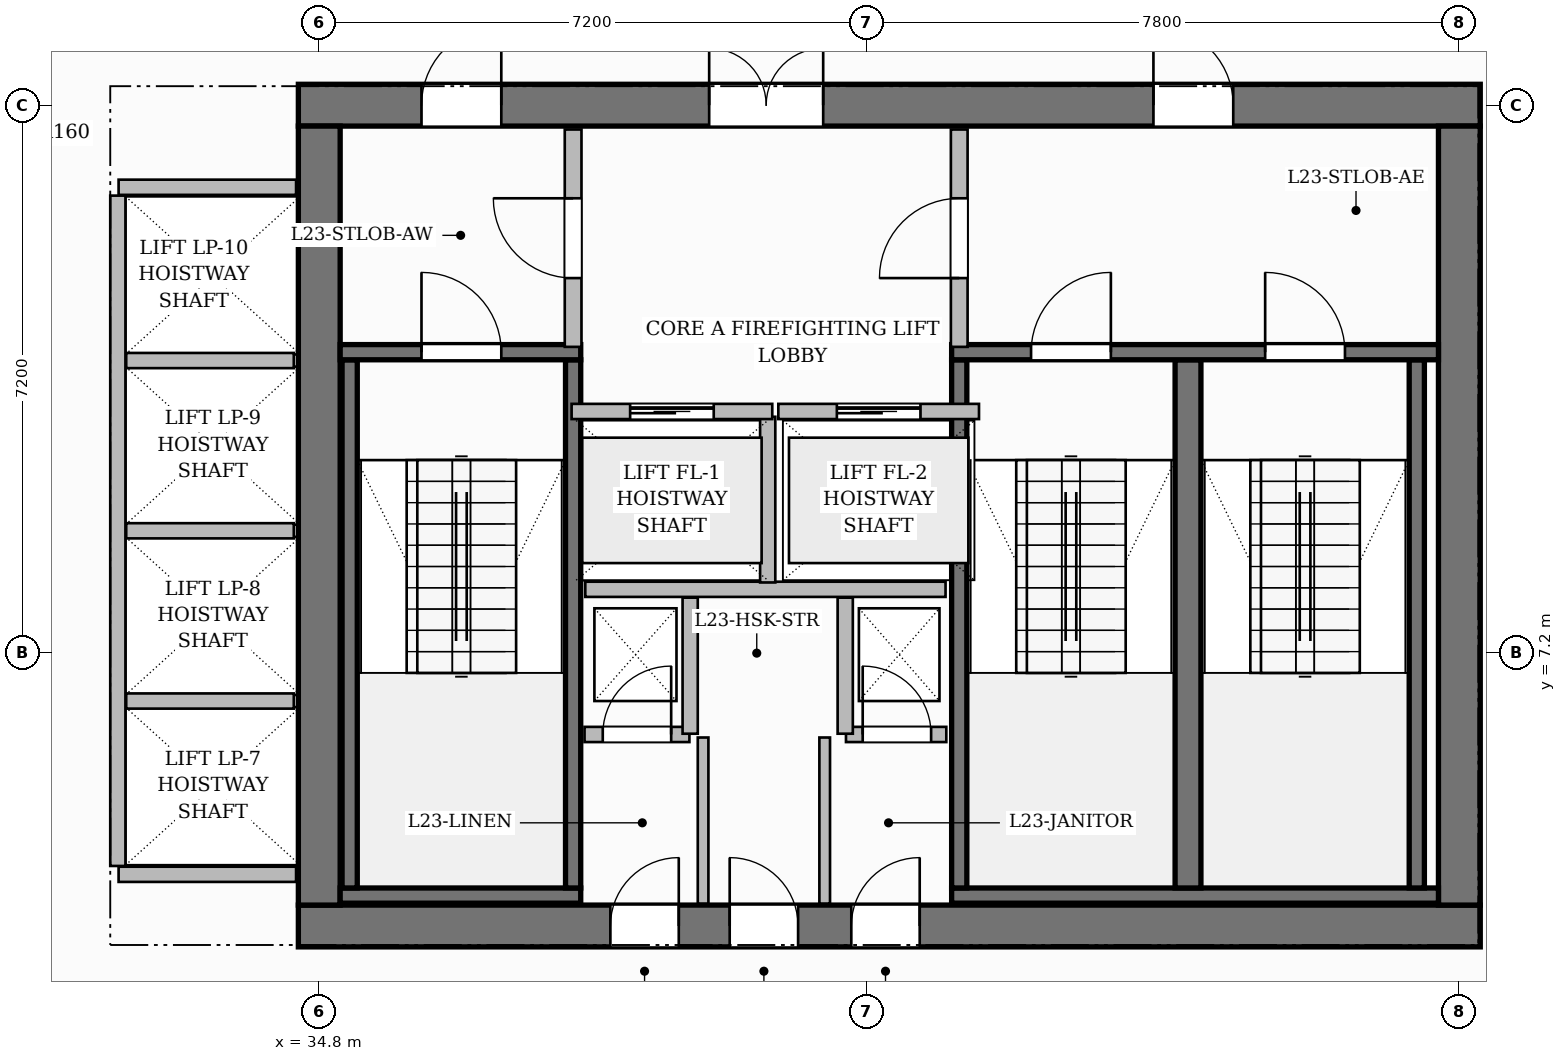
"""IFC4 building model, lengths in metres.
Left out: names, types, materials, properties, quantities, classifications, styles, units other than length and angle.
Written with IfcOpenShell. Run it as: python <this file> out.ifc"""

import sys

from ifc_helpers import new_model, si_unit, direction, frame, frame_2d, origin, place, context, subcontext, project, spatial, rectangle, extrude, source, transform, mapped, element, fill, save


model = new_model("IFC4")
c1 = context("Model", 3, precision=1e-05, world=origin(), true_north=direction((0.0, 1.0)))
c2 = subcontext(c1, "Body", "Model", "MODEL_VIEW")
j1 = project(units=[si_unit("LENGTHUNIT", "METRE"), si_unit("PLANEANGLEUNIT", "RADIAN")], contexts=[c1])
p1 = place(None, origin())
s1 = spatial("IfcSite", under=j1, at=p1, CompositionType="ELEMENT")
p2 = place(p1, origin())
s2 = spatial("IfcBuilding", under=s1, at=p2, CompositionType="ELEMENT")
p3 = place(p2, frame((0.0, 0.0, 95.3)))
s3 = spatial("IfcBuildingStorey", under=s2, at=p3, CompositionType="ELEMENT", Elevation=95.3)
p4 = place(p3, frame((34.525, 3.6, 0.0), z_axis=(0.0, 0.0, 1.0), x_axis=(1.0, 0.0, 0.0)))
e1 = element("IfcWall", 1, at=p4, inside=s3, PredefinedType="SHEAR", context=c2, shape_type="SweptSolid", body=[
    extrude(rectangle(XDim=15.55, YDim=0.55, at=frame_2d((7.775, 0.0))), origin(), (0.0, 0.0, 1.0), 3.7),
])
p5 = place(p4, frame((4.105, 0.0, 0.0)))
e2 = element("IfcOpeningElement", 2, at=p5, cuts=e1, PredefinedType="OPENING", context=c2, shape_type="SweptSolid", body=[
    extrude(rectangle(XDim=0.9, YDim=2.1, at=frame_2d((0.45, 1.05))), frame((0.0, 0.285, 0.0), z_axis=(0.0, -1.0, 0.0), x_axis=(1.0, 0.0, 0.0)), (0.0, 0.0, 1.0), 0.57),
])
p6 = place(p4, frame((5.675, 0.0, 0.0)))
e3 = element("IfcOpeningElement", 3, at=p6, cuts=e1, PredefinedType="OPENING", context=c2, shape_type="SweptSolid", body=[
    extrude(rectangle(XDim=0.9, YDim=2.1, at=frame_2d((0.45, 1.05))), frame((0.0, 0.285, 0.0), z_axis=(0.0, -1.0, 0.0), x_axis=(1.0, 0.0, 0.0)), (0.0, 0.0, 1.0), 0.57),
])
p7 = place(p4, frame((7.275, 0.0, 0.0)))
e4 = element("IfcOpeningElement", 4, at=p7, cuts=e1, PredefinedType="OPENING", context=c2, shape_type="SweptSolid", body=[
    extrude(rectangle(XDim=0.9, YDim=2.1, at=frame_2d((0.45, 1.05))), frame((0.0, 0.285, 0.0), z_axis=(0.0, -1.0, 0.0), x_axis=(1.0, 0.0, 0.0)), (0.0, 0.0, 1.0), 0.57),
])
p8 = place(p3, frame((34.525, 14.4, 0.0), z_axis=(0.0, 0.0, 1.0), x_axis=(1.0, 0.0, 0.0)))
e5 = element("IfcWall", 5, at=p8, inside=s3, PredefinedType="SHEAR", context=c2, shape_type="SweptSolid", body=[
    extrude(rectangle(XDim=15.55, YDim=0.55, at=frame_2d((7.775, 0.0))), origin(), (0.0, 0.0, 1.0), 3.7),
])
p9 = place(p8, frame((5.405, 0.0, 0.0)))
e6 = element("IfcOpeningElement", 6, at=p9, cuts=e5, PredefinedType="OPENING", context=c2, shape_type="SweptSolid", body=[
    extrude(rectangle(XDim=1.5, YDim=2.2, at=frame_2d((0.75, 1.1))), frame((0.0, 0.285, 0.0), z_axis=(0.0, -1.0, 0.0), x_axis=(1.0, 0.0, 0.0)), (0.0, 0.0, 1.0), 0.57),
])
p10 = place(p8, frame((1.62, 0.0, 0.0)))
e7 = element("IfcOpeningElement", 7, at=p10, cuts=e5, PredefinedType="OPENING", context=c2, shape_type="SweptSolid", body=[
    extrude(rectangle(XDim=1.05, YDim=2.15, at=frame_2d((0.525, 1.075))), frame((0.0, 0.285, 0.0), z_axis=(0.0, -1.0, 0.0), x_axis=(1.0, 0.0, 0.0)), (0.0, 0.0, 1.0), 0.57),
])
p11 = place(p8, frame((11.25, 0.0, 0.0)))
e8 = element("IfcOpeningElement", 8, at=p11, cuts=e5, PredefinedType="OPENING", context=c2, shape_type="SweptSolid", body=[
    extrude(rectangle(XDim=1.05, YDim=2.15, at=frame_2d((0.525, 1.075))), frame((0.0, 0.285, 0.0), z_axis=(0.0, -1.0, 0.0), x_axis=(1.0, 0.0, 0.0)), (0.0, 0.0, 1.0), 0.57),
])
for number, where, z_axis, x_axis in (
    (9, (34.8, 3.875, 0.0), (0.0, 0.0, 1.0), (0.0, 1.0, 0.0)),
    (10, (49.8, 3.875, 0.0), (0.0, 0.0, 1.0), (0.0, 1.0, 0.0)),
):
    element("IfcWall", number, at=place(p3, frame(where, z_axis=z_axis, x_axis=x_axis)), inside=s3, PredefinedType="SHEAR", context=c2, shape_type="SweptSolid", body=[
        extrude(rectangle(XDim=10.25, YDim=0.55, at=frame_2d((5.125, 0.0))), origin(), (0.0, 0.0, 1.0), 3.7),
    ])
p12 = place(p3, frame((35.075, 4.0, 0.0), z_axis=(0.0, 0.0, 1.0), x_axis=(1.0, 0.0, 0.0)))
e11 = element("IfcWall", 11, at=p12, inside=s3, PredefinedType="SHEAR", context=c2, shape_type="SweptSolid", body=[
    extrude(rectangle(XDim=3.165, YDim=0.2, at=frame_2d((1.583, 0.0))), origin(), (0.0, 0.0, 1.0), 3.7),
])
for number, where, z_axis, x_axis in (
    (12, (35.2, 4.1, 0.0), (0.0, 0.0, 1.0), (0.0, 1.0, 0.0)),
    (13, (38.14, 4.1, 0.0), (0.0, 0.0, 1.0), (0.0, 1.0, 0.0)),
):
    element("IfcWall", number, at=place(p3, frame(where, z_axis=z_axis, x_axis=x_axis)), inside=s3, PredefinedType="SHEAR", context=c2, shape_type="SweptSolid", body=[
        extrude(rectangle(XDim=6.95, YDim=0.2, at=frame_2d((3.475, 0.0))), origin(), (0.0, 0.0, 1.0), 3.7),
    ])
p13 = place(p3, frame((35.075, 11.15, 0.0), z_axis=(0.0, 0.0, 1.0), x_axis=(1.0, 0.0, 0.0)))
e14 = element("IfcWall", 14, at=p13, inside=s3, PredefinedType="SHEAR", context=c2, shape_type="SweptSolid", body=[
    extrude(rectangle(XDim=3.165, YDim=0.2, at=frame_2d((1.583, 0.0))), origin(), (0.0, 0.0, 1.0), 3.7),
])
p14 = place(p13, frame((1.07, 0.0, 0.0)))
e15 = element("IfcOpeningElement", 15, at=p14, cuts=e14, PredefinedType="OPENING", context=c2, shape_type="SweptSolid", body=[
    extrude(rectangle(XDim=1.05, YDim=2.2, at=frame_2d((0.525, 1.1))), frame((0.0, 0.11, 0.0), z_axis=(0.0, -1.0, 0.0), x_axis=(1.0, 0.0, 0.0)), (0.0, 0.0, 1.0), 0.22),
])
p15 = place(p3, frame((43.12, 4.0, 0.0), z_axis=(0.0, 0.0, 1.0), x_axis=(1.0, 0.0, 0.0)))
e16 = element("IfcWall", 16, at=p15, inside=s3, PredefinedType="SHEAR", context=c2, shape_type="SweptSolid", body=[
    extrude(rectangle(XDim=6.405, YDim=0.2, at=frame_2d((3.202, 0.0))), origin(), (0.0, 0.0, 1.0), 3.7),
])
p16 = place(p3, frame((43.22, 4.1, 0.0), z_axis=(0.0, 0.0, 1.0), x_axis=(0.0, 1.0, 0.0)))
e17 = element("IfcWall", 17, at=p16, inside=s3, PredefinedType="SHEAR", context=c2, shape_type="SweptSolid", body=[
    extrude(rectangle(XDim=6.95, YDim=0.2, at=frame_2d((3.475, 0.0))), origin(), (0.0, 0.0, 1.0), 3.7),
])
p17 = place(p3, frame((46.23, 4.1, 0.0), z_axis=(0.0, 0.0, 1.0), x_axis=(0.0, 1.0, 0.0)))
e18 = element("IfcWall", 18, at=p17, inside=s3, PredefinedType="SHEAR", context=c2, shape_type="SweptSolid", body=[
    extrude(rectangle(XDim=6.95, YDim=0.34, at=frame_2d((3.475, 0.0))), origin(), (0.0, 0.0, 1.0), 3.7),
])
p18 = place(p3, frame((49.24, 4.1, 0.0), z_axis=(0.0, 0.0, 1.0), x_axis=(0.0, 1.0, 0.0)))
e19 = element("IfcWall", 19, at=p18, inside=s3, PredefinedType="SHEAR", context=c2, shape_type="SweptSolid", body=[
    extrude(rectangle(XDim=6.95, YDim=0.2, at=frame_2d((3.475, 0.0))), origin(), (0.0, 0.0, 1.0), 3.7),
])
p19 = place(p3, frame((43.12, 11.15, 0.0), z_axis=(0.0, 0.0, 1.0), x_axis=(1.0, 0.0, 0.0)))
e20 = element("IfcWall", 20, at=p19, inside=s3, PredefinedType="SHEAR", context=c2, shape_type="SweptSolid", body=[
    extrude(rectangle(XDim=6.405, YDim=0.2, at=frame_2d((3.202, 0.0))), origin(), (0.0, 0.0, 1.0), 3.7),
])
p20 = place(p19, frame((1.045, 0.0, 0.0)))
e21 = element("IfcOpeningElement", 21, at=p20, cuts=e20, PredefinedType="OPENING", context=c2, shape_type="SweptSolid", body=[
    extrude(rectangle(XDim=1.05, YDim=2.2, at=frame_2d((0.525, 1.1))), frame((0.0, 0.11, 0.0), z_axis=(0.0, -1.0, 0.0), x_axis=(1.0, 0.0, 0.0)), (0.0, 0.0, 1.0), 0.22),
])
p21 = place(p19, frame((4.125, 0.0, 0.0)))
e22 = element("IfcOpeningElement", 22, at=p21, cuts=e20, PredefinedType="OPENING", context=c2, shape_type="SweptSolid", body=[
    extrude(rectangle(XDim=1.05, YDim=2.2, at=frame_2d((0.525, 1.1))), frame((0.0, 0.11, 0.0), z_axis=(0.0, -1.0, 0.0), x_axis=(1.0, 0.0, 0.0)), (0.0, 0.0, 1.0), 0.22),
])
p22 = place(p3, frame((38.3, 8.03, 0.0), z_axis=(0.0, 0.0, 1.0), x_axis=(1.0, 0.0, 0.0)))
e23 = element("IfcWall", 23, at=p22, inside=s3, PredefinedType="PARTITIONING", context=c2, shape_type="SweptSolid", body=[
    extrude(rectangle(XDim=4.74, YDim=0.2, at=frame_2d((2.37, 0.0))), origin(), (0.0, 0.0, 1.0), 3.45),
])
p23 = place(p3, frame((40.7, 8.12, 0.0), z_axis=(0.0, 0.0, 1.0), x_axis=(0.0, 1.0, 0.0)))
e24 = element("IfcWall", 24, at=p23, inside=s3, PredefinedType="PARTITIONING", context=c2, shape_type="SweptSolid", body=[
    extrude(rectangle(XDim=2.18, YDim=0.2, at=frame_2d((1.09, 0.0))), origin(), (0.0, 0.0, 1.0), 3.45),
])
p24 = place(p3, frame((38.14, 11.22, 0.0), z_axis=(0.0, 0.0, 1.0), x_axis=(0.0, 1.0, 0.0)))
e25 = element("IfcWall", 25, at=p24, inside=s3, PredefinedType="PARTITIONING", context=c2, shape_type="SweptSolid", body=[
    extrude(rectangle(XDim=2.86, YDim=0.22, at=frame_2d((1.43, 0.0))), origin(), (0.0, 0.0, 1.0), 3.45),
])
p25 = place(p24, frame((0.905, 0.0, 0.0)))
e26 = element("IfcOpeningElement", 26, at=p25, cuts=e25, PredefinedType="OPENING", context=c2, shape_type="SweptSolid", body=[
    extrude(rectangle(XDim=1.05, YDim=2.15, at=frame_2d((0.525, 1.075))), frame((0.0, 0.12, 0.0), z_axis=(0.0, -1.0, 0.0), x_axis=(1.0, 0.0, 0.0)), (0.0, 0.0, 1.0), 0.24),
])
p26 = place(p3, frame((43.22, 11.22, 0.0), z_axis=(0.0, 0.0, 1.0), x_axis=(0.0, 1.0, 0.0)))
e27 = element("IfcWall", 27, at=p26, inside=s3, PredefinedType="PARTITIONING", context=c2, shape_type="SweptSolid", body=[
    extrude(rectangle(XDim=2.86, YDim=0.22, at=frame_2d((1.43, 0.0))), origin(), (0.0, 0.0, 1.0), 3.45),
])
p27 = place(p26, frame((0.905, 0.0, 0.0)))
e28 = element("IfcOpeningElement", 28, at=p27, cuts=e27, PredefinedType="OPENING", context=c2, shape_type="SweptSolid", body=[
    extrude(rectangle(XDim=1.05, YDim=2.15, at=frame_2d((0.525, 1.075))), frame((0.0, 0.12, 0.0), z_axis=(0.0, -1.0, 0.0), x_axis=(1.0, 0.0, 0.0)), (0.0, 0.0, 1.0), 0.24),
])
p28 = place(p3, frame((38.29, 6.12, 0.0), z_axis=(0.0, 0.0, 1.0), x_axis=(1.0, 0.0, 0.0)))
e29 = element("IfcWall", 29, at=p28, inside=s3, PredefinedType="PARTITIONING", context=c2, shape_type="SweptSolid", body=[
    extrude(rectangle(XDim=1.38, YDim=0.2, at=frame_2d((0.69, 0.0))), origin(), (0.0, 0.0, 1.0), 3.45),
])
p29 = place(p28, frame((0.24, 0.0, 0.0)))
e30 = element("IfcOpeningElement", 30, at=p29, cuts=e29, PredefinedType="OPENING", context=c2, shape_type="SweptSolid", body=[
    extrude(rectangle(XDim=0.9, YDim=2.1, at=frame_2d((0.45, 1.05))), frame((0.0, 0.11, 0.0), z_axis=(0.0, -1.0, 0.0), x_axis=(1.0, 0.0, 0.0)), (0.0, 0.0, 1.0), 0.22),
])
p30 = place(p3, frame((39.68, 6.13, 0.0), z_axis=(0.0, 0.0, 1.0), x_axis=(0.0, 1.0, 0.0)))
e31 = element("IfcWall", 31, at=p30, inside=s3, PredefinedType="PARTITIONING", context=c2, shape_type="SweptSolid", body=[
    extrude(rectangle(XDim=1.79, YDim=0.2, at=frame_2d((0.895, 0.0))), origin(), (0.0, 0.0, 1.0), 3.45),
])
p31 = place(p3, frame((41.73, 6.12, 0.0), z_axis=(0.0, 0.0, 1.0), x_axis=(1.0, 0.0, 0.0)))
e32 = element("IfcWall", 32, at=p31, inside=s3, PredefinedType="PARTITIONING", context=c2, shape_type="SweptSolid", body=[
    extrude(rectangle(XDim=1.32, YDim=0.2, at=frame_2d((0.66, 0.0))), origin(), (0.0, 0.0, 1.0), 3.45),
])
p32 = place(p31, frame((0.22, 0.0, 0.0)))
e33 = element("IfcOpeningElement", 33, at=p32, cuts=e32, PredefinedType="OPENING", context=c2, shape_type="SweptSolid", body=[
    extrude(rectangle(XDim=0.9, YDim=2.1, at=frame_2d((0.45, 1.05))), frame((0.0, 0.11, 0.0), z_axis=(0.0, -1.0, 0.0), x_axis=(1.0, 0.0, 0.0)), (0.0, 0.0, 1.0), 0.22),
])
p33 = place(p3, frame((41.72, 6.13, 0.0), z_axis=(0.0, 0.0, 1.0), x_axis=(0.0, 1.0, 0.0)))
e34 = element("IfcWall", 34, at=p33, inside=s3, PredefinedType="PARTITIONING", context=c2, shape_type="SweptSolid", body=[
    extrude(rectangle(XDim=1.79, YDim=0.2, at=frame_2d((0.895, 0.0))), origin(), (0.0, 0.0, 1.0), 3.45),
])
for number, where, z_axis, x_axis in (
    (35, (39.85, 3.895, 0.0), (0.0, 0.0, 1.0), (0.0, 1.0, 0.0)),
    (36, (41.45, 3.895, 0.0), (0.0, 0.0, 1.0), (0.0, 1.0, 0.0)),
):
    element("IfcWall", number, at=place(p3, frame(where, z_axis=z_axis, x_axis=x_axis)), inside=s3, PredefinedType="PARTITIONING", context=c2, shape_type="SweptSolid", body=[
        extrude(rectangle(XDim=2.185, YDim=0.14, at=frame_2d((1.093, 0.0))), origin(), (0.0, 0.0, 1.0), 3.45),
    ])
for number, where, z_axis, x_axis in (
    (37, (32.16, 4.28, 0.0), (0.0, 0.0, 1.0), (1.0, 0.0, 0.0)),
    (38, (32.16, 13.32, 0.0), (0.0, 0.0, 1.0), (1.0, 0.0, 0.0)),
):
    element("IfcWall", number, at=place(p3, frame(where, z_axis=z_axis, x_axis=x_axis)), inside=s3, PredefinedType="PARTITIONING", context=c2, shape_type="SweptSolid", body=[
        extrude(rectangle(XDim=2.335, YDim=0.2, at=frame_2d((1.167, 0.0))), origin(), (0.0, 0.0, 1.0), 3.45),
    ])
p34 = place(p3, frame((32.15, 4.39, 0.0), z_axis=(0.0, 0.0, 1.0), x_axis=(0.0, 1.0, 0.0)))
e39 = element("IfcWall", 39, at=p34, inside=s3, PredefinedType="PARTITIONING", context=c2, shape_type="SweptSolid", body=[
    extrude(rectangle(XDim=8.82, YDim=0.2, at=frame_2d((4.41, 0.0))), origin(), (0.0, 0.0, 1.0), 3.45),
])
for number, where, z_axis, x_axis in (
    (40, (32.26, 6.56, 0.0), (0.0, 0.0, 1.0), (1.0, 0.0, 0.0)),
    (41, (32.26, 8.8, 0.0), (0.0, 0.0, 1.0), (1.0, 0.0, 0.0)),
    (42, (32.26, 11.04, 0.0), (0.0, 0.0, 1.0), (1.0, 0.0, 0.0)),
):
    element("IfcWall", number, at=place(p3, frame(where, z_axis=z_axis, x_axis=x_axis)), inside=s3, PredefinedType="PARTITIONING", context=c2, shape_type="SweptSolid", body=[
        extrude(rectangle(XDim=2.205, YDim=0.2, at=frame_2d((1.103, 0.0))), origin(), (0.0, 0.0, 1.0), 3.45),
    ])
p35 = place(p3, frame((38.12, 10.37, 0.0), z_axis=(0.0, 0.0, 1.0), x_axis=(1.0, 0.0, 0.0)))
e43 = element("IfcWall", 43, at=p35, inside=s3, PredefinedType="PARTITIONING", context=c2, shape_type="SweptSolid", body=[
    extrude(rectangle(XDim=2.64, YDim=0.2, at=frame_2d((1.32, 0.0))), origin(), (0.0, 0.0, 1.0), 3.45),
])
p36 = place(p35, frame((0.77, 0.0, 0.0)))
e44 = element("IfcOpeningElement", 44, at=p36, cuts=e43, PredefinedType="OPENING", context=c2, shape_type="SweptSolid", body=[
    extrude(rectangle(XDim=1.1, YDim=2.2, at=frame_2d((0.55, 1.1))), frame((0.0, 0.11, 0.0), z_axis=(0.0, -1.0, 0.0), x_axis=(1.0, 0.0, 0.0)), (0.0, 0.0, 1.0), 0.22),
])
p37 = place(p3, frame((40.84, 10.37, 0.0), z_axis=(0.0, 0.0, 1.0), x_axis=(1.0, 0.0, 0.0)))
e45 = element("IfcWall", 45, at=p37, inside=s3, PredefinedType="PARTITIONING", context=c2, shape_type="SweptSolid", body=[
    extrude(rectangle(XDim=2.64, YDim=0.2, at=frame_2d((1.32, 0.0))), origin(), (0.0, 0.0, 1.0), 3.45),
])
p38 = place(p37, frame((0.77, 0.0, 0.0)))
e46 = element("IfcOpeningElement", 46, at=p38, cuts=e45, PredefinedType="OPENING", context=c2, shape_type="SweptSolid", body=[
    extrude(rectangle(XDim=1.1, YDim=2.2, at=frame_2d((0.55, 1.1))), frame((0.0, 0.11, 0.0), z_axis=(0.0, -1.0, 0.0), x_axis=(1.0, 0.0, 0.0)), (0.0, 0.0, 1.0), 0.22),
])
m1 = source(origin(), c2, "Body", "SweptSolid", [
    extrude(rectangle(XDim=1.05, YDim=2.2, at=frame_2d((0.525, 1.1))), frame((0.0, 0.025, 0.0), z_axis=(0.0, -1.0, 0.0), x_axis=(1.0, 0.0, 0.0)), (0.0, 0.0, 1.0), 0.05),
])
p39 = place(p14, origin())
e47 = element("IfcDoor", 47, at=p39, inside=s3, OperationType="SINGLE_SWING_LEFT", PredefinedType="DOOR", context=c2, shape_type="MappedRepresentation", body=[
    mapped(m1, transform((0.0, 0.0, 0.0), scale=1.0)),
])
fill(e15, e47)
p40 = place(p20, origin())
e48 = element("IfcDoor", 48, at=p40, inside=s3, OperationType="SINGLE_SWING_RIGHT", PredefinedType="DOOR", context=c2, shape_type="MappedRepresentation", body=[
    mapped(m1, transform((0.0, 0.0, 0.0), scale=1.0)),
])
fill(e21, e48)
p41 = place(p21, origin())
e49 = element("IfcDoor", 49, at=p41, inside=s3, OperationType="SINGLE_SWING_LEFT", PredefinedType="DOOR", context=c2, shape_type="MappedRepresentation", body=[
    mapped(m1, transform((0.0, 0.0, 0.0), scale=1.0)),
])
fill(e22, e49)
m2 = source(origin(), c2, "Body", "SweptSolid", [
    extrude(rectangle(XDim=1.05, YDim=2.15, at=frame_2d((0.525, 1.075))), frame((0.0, 0.025, 0.0), z_axis=(0.0, -1.0, 0.0), x_axis=(1.0, 0.0, 0.0)), (0.0, 0.0, 1.0), 0.05),
])
p42 = place(p25, origin())
e50 = element("IfcDoor", 50, at=p42, inside=s3, OperationType="SINGLE_SWING_RIGHT", PredefinedType="DOOR", context=c2, shape_type="MappedRepresentation", body=[
    mapped(m2, transform((0.0, 0.0, 0.0), scale=1.0)),
])
fill(e26, e50)
p43 = place(p27, origin())
e51 = element("IfcDoor", 51, at=p43, inside=s3, OperationType="SINGLE_SWING_LEFT", PredefinedType="DOOR", context=c2, shape_type="MappedRepresentation", body=[
    mapped(m2, transform((0.0, 0.0, 0.0), scale=1.0)),
])
fill(e28, e51)
m3 = source(origin(), c2, "Body", "SweptSolid", [
    extrude(rectangle(XDim=1.5, YDim=2.2, at=frame_2d((0.75, 1.1))), frame((0.0, 0.025, 0.0), z_axis=(0.0, -1.0, 0.0), x_axis=(1.0, 0.0, 0.0)), (0.0, 0.0, 1.0), 0.05),
])
p44 = place(p9, origin())
e52 = element("IfcDoor", 52, at=p44, inside=s3, OperationType="DOUBLE_DOOR_SINGLE_SWING", PredefinedType="DOOR", context=c2, shape_type="MappedRepresentation", body=[
    mapped(m3, transform((0.0, 0.0, 0.0), scale=1.0)),
])
fill(e6, e52)
p45 = place(p10, origin())
e53 = element("IfcDoor", 53, at=p45, inside=s3, OperationType="SINGLE_SWING_RIGHT", PredefinedType="DOOR", context=c2, shape_type="MappedRepresentation", body=[
    mapped(m2, transform((0.0, 0.0, 0.0), scale=1.0)),
])
fill(e7, e53)
p46 = place(p11, origin())
e54 = element("IfcDoor", 54, at=p46, inside=s3, OperationType="SINGLE_SWING_LEFT", PredefinedType="DOOR", context=c2, shape_type="MappedRepresentation", body=[
    mapped(m2, transform((0.0, 0.0, 0.0), scale=1.0)),
])
fill(e8, e54)
m4 = source(origin(), c2, "Body", "SweptSolid", [
    extrude(rectangle(XDim=0.9, YDim=2.1, at=frame_2d((0.45, 1.05))), frame((0.0, 0.025, 0.0), z_axis=(0.0, -1.0, 0.0), x_axis=(1.0, 0.0, 0.0)), (0.0, 0.0, 1.0), 0.05),
])
p47 = place(p29, origin())
e55 = element("IfcDoor", 55, at=p47, inside=s3, OperationType="SINGLE_SWING_RIGHT", PredefinedType="DOOR", context=c2, shape_type="MappedRepresentation", body=[
    mapped(m4, transform((0.0, 0.0, 0.0), scale=1.0)),
])
fill(e30, e55)
p48 = place(p32, origin())
e56 = element("IfcDoor", 56, at=p48, inside=s3, OperationType="SINGLE_SWING_LEFT", PredefinedType="DOOR", context=c2, shape_type="MappedRepresentation", body=[
    mapped(m4, transform((0.0, 0.0, 0.0), scale=1.0)),
])
fill(e33, e56)
p49 = place(p5, origin())
e57 = element("IfcDoor", 57, at=p49, inside=s3, OperationType="SINGLE_SWING_RIGHT", PredefinedType="DOOR", context=c2, shape_type="MappedRepresentation", body=[
    mapped(m4, transform((0.0, 0.0, 0.0), scale=1.0)),
])
fill(e2, e57)
p50 = place(p6, origin())
e58 = element("IfcDoor", 58, at=p50, inside=s3, OperationType="SINGLE_SWING_LEFT", PredefinedType="DOOR", context=c2, shape_type="MappedRepresentation", body=[
    mapped(m4, transform((0.0, 0.0, 0.0), scale=1.0)),
])
fill(e3, e58)
p51 = place(p7, origin())
e59 = element("IfcDoor", 59, at=p51, inside=s3, OperationType="SINGLE_SWING_RIGHT", PredefinedType="DOOR", context=c2, shape_type="MappedRepresentation", body=[
    mapped(m4, transform((0.0, 0.0, 0.0), scale=1.0)),
])
fill(e4, e59)
m5 = source(origin(), c2, "Body", "SweptSolid", [
    extrude(rectangle(XDim=1.1, YDim=2.2, at=frame_2d((0.55, 1.1))), frame((0.0, 0.025, 0.0), z_axis=(0.0, -1.0, 0.0), x_axis=(1.0, 0.0, 0.0)), (0.0, 0.0, 1.0), 0.05),
])
p52 = place(p36, origin())
e60 = element("IfcDoor", 60, at=p52, inside=s3, OperationType="SLIDING_TO_LEFT", PredefinedType="DOOR", context=c2, shape_type="MappedRepresentation", body=[
    mapped(m5, transform((0.0, 0.0, 0.0), scale=1.0)),
])
fill(e44, e60)
p53 = place(p38, origin())
e61 = element("IfcDoor", 61, at=p53, inside=s3, OperationType="SLIDING_TO_LEFT", PredefinedType="DOOR", context=c2, shape_type="MappedRepresentation", body=[
    mapped(m5, transform((0.0, 0.0, 0.0), scale=1.0)),
])
fill(e46, e61)
save(model, sys.argv[1])
